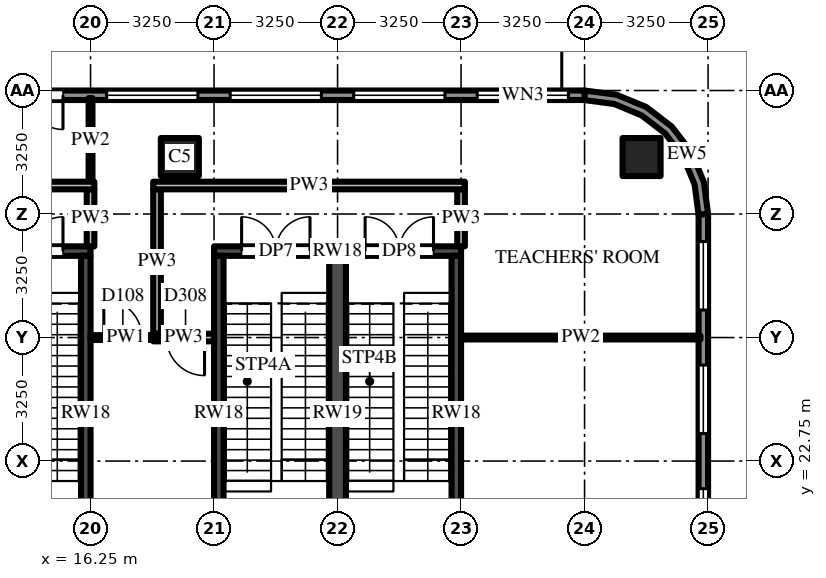
"""IFC4 building model, lengths in metres.
Left out: names, types, materials, properties, quantities, classifications, styles, units other than length and angle.
Written with IfcOpenShell. Run it as: python <this file> out.ifc"""

import sys

from ifc_helpers import new_model, si_unit, direction, frame, frame_2d, origin, origin_2d, place, context, subcontext, project, spatial, polyline, rectangle, outline, extrude, source, transform, mapped, element, fill, save


model = new_model("IFC4")
c1 = context("Model", 3, precision=1e-05, world=origin(), true_north=direction((0.0, 1.0)))
c2 = subcontext(c1, "Body", "Model", "MODEL_VIEW")
j1 = project(units=[si_unit("LENGTHUNIT", "METRE"), si_unit("PLANEANGLEUNIT", "RADIAN")], contexts=[c1])
p1 = place(None, origin())
s1 = spatial("IfcSite", under=j1, at=p1, CompositionType="ELEMENT")
p2 = place(p1, origin())
s2 = spatial("IfcBuilding", under=s1, at=p2, CompositionType="ELEMENT")
p3 = place(p2, frame((0.0, 0.0, 24.0)))
s3 = spatial("IfcBuildingStorey", under=s2, at=p3, CompositionType="ELEMENT", Elevation=24.0)
m1 = source(origin(), c2, "Body", "SweptSolid", [
    extrude(rectangle(XDim=1.0, YDim=1.0, at=origin_2d()), origin(), (0.0, 0.0, 1.0), 5.0),
])
for number, where, z_axis, x_axis in (
    (1, (18.6, 30.75, 0.0), (0.0, 0.0, 1.0), (1.0, 0.0, 0.0)),
    (2, (30.75, 30.75, 0.0), (0.0, 0.0, 1.0), (1.0, 0.0, 0.0)),
):
    element("IfcColumn", number, at=place(p3, frame(where, z_axis=z_axis, x_axis=x_axis)), inside=s3, PredefinedType="COLUMN", context=c2, shape_type="MappedRepresentation", body=[
        mapped(m1, transform((0.0, 0.0, 0.0))),
    ])
m2 = source(origin(), c2, "Body", "SweptSolid", [
    extrude(rectangle(XDim=6.5, YDim=0.25, at=frame_2d((3.25, 0.0))), origin(), (0.0, 0.0, 1.0), 4.7),
])
p4 = place(p3, frame((9.75, 28.275, 0.0), z_axis=(0.0, 0.0, 1.0), x_axis=(1.0, 0.0, 0.0)))
e3 = element("IfcWall", 3, at=p4, inside=s3, PredefinedType="SHEAR", context=c2, shape_type="MappedRepresentation", body=[
    mapped(m2, transform((0.0, 0.0, 0.0))),
])
m3 = source(origin(), c2, "Body", "SweptSolid", [
    extrude(rectangle(XDim=1.8, YDim=2.1, at=frame_2d((0.9, 1.05))), frame((0.0, 0.135, 0.0), z_axis=(0.0, -1.0, 0.0), x_axis=(1.0, 0.0, 0.0)), (0.0, 0.0, 1.0), 0.27),
])
p5 = place(p4, frame((0.725, 0.0, 0.0)))
e4 = element("IfcOpeningElement", 4, at=p5, cuts=e3, PredefinedType="OPENING", context=c2, shape_type="MappedRepresentation", body=[
    mapped(m3, transform((0.0, 0.0, 0.0))),
])
p6 = place(p4, frame((3.975, 0.0, 0.0)))
e5 = element("IfcOpeningElement", 5, at=p6, cuts=e3, PredefinedType="OPENING", context=c2, shape_type="MappedRepresentation", body=[
    mapped(m3, transform((0.0, 0.0, 0.0))),
])
m4 = source(origin(), c2, "Body", "SweptSolid", [
    extrude(rectangle(XDim=8.3, YDim=0.25, at=frame_2d((4.15, 0.0))), origin(), (0.0, 0.0, 1.0), 4.7),
])
p7 = place(p3, frame((16.125, 19.85, 0.0), z_axis=(0.0, 0.0, 1.0), x_axis=(0.0, 1.0, 0.0)))
e6 = element("IfcWall", 6, at=p7, inside=s3, PredefinedType="SHEAR", context=c2, shape_type="MappedRepresentation", body=[
    mapped(m4, transform((0.0, 0.0, 0.0))),
])
p8 = place(p3, frame((19.5, 28.275, 0.0), z_axis=(0.0, 0.0, 1.0), x_axis=(1.0, 0.0, 0.0)))
e7 = element("IfcWall", 7, at=p8, inside=s3, PredefinedType="SHEAR", context=c2, shape_type="MappedRepresentation", body=[
    mapped(m2, transform((0.0, 0.0, 0.0))),
])
p9 = place(p8, frame((0.725, 0.0, 0.0)))
e8 = element("IfcOpeningElement", 8, at=p9, cuts=e7, PredefinedType="OPENING", context=c2, shape_type="MappedRepresentation", body=[
    mapped(m3, transform((0.0, 0.0, 0.0))),
])
p10 = place(p8, frame((3.975, 0.0, 0.0)))
e9 = element("IfcOpeningElement", 9, at=p10, cuts=e7, PredefinedType="OPENING", context=c2, shape_type="MappedRepresentation", body=[
    mapped(m3, transform((0.0, 0.0, 0.0))),
])
for number, where, z_axis, x_axis in (
    (10, (19.625, 19.85, 0.0), (0.0, 0.0, 1.0), (0.0, 1.0, 0.0)),
    (11, (25.875, 19.85, 0.0), (0.0, 0.0, 1.0), (0.0, 1.0, 0.0)),
):
    element("IfcWall", number, at=place(p3, frame(where, z_axis=z_axis, x_axis=x_axis)), inside=s3, PredefinedType="SHEAR", context=c2, shape_type="MappedRepresentation", body=[
        mapped(m4, transform((0.0, 0.0, 0.0))),
    ])
m5 = source(origin(), c2, "Body", "SweptSolid", [
    extrude(rectangle(XDim=8.3, YDim=0.44, at=frame_2d((4.15, 0.0))), origin(), (0.0, 0.0, 1.0), 4.7),
])
p11 = place(p3, frame((22.75, 19.85, 0.0), z_axis=(0.0, 0.0, 1.0), x_axis=(0.0, 1.0, 0.0)))
e12 = element("IfcWall", 12, at=p11, inside=s3, PredefinedType="SHEAR", context=c2, shape_type="MappedRepresentation", body=[
    mapped(m5, transform((0.0, 0.0, 0.0))),
])
m6 = source(origin(), c2, "Body", "SweptSolid", [
    extrude(rectangle(XDim=58.5, YDim=0.25, at=frame_2d((29.25, 0.0))), origin(), (0.0, 0.0, 1.0), 4.7),
])
p12 = place(p3, frame((32.375, -29.25, 0.0), z_axis=(0.0, 0.0, 1.0), x_axis=(0.0, 1.0, 0.0)))
e13 = element("IfcWall", 13, at=p12, inside=s3, PredefinedType="SOLIDWALL", context=c2, shape_type="MappedRepresentation", body=[
    mapped(m6, transform((0.0, 0.0, 0.0))),
])
m7 = source(origin(), c2, "Body", "SweptSolid", [
    extrude(rectangle(XDim=1.8, YDim=3.3, at=frame_2d((0.9, 1.65))), frame((0.0, 0.135, 0.0), z_axis=(0.0, -1.0, 0.0), x_axis=(1.0, 0.0, 0.0)), (0.0, 0.0, 1.0), 0.27),
])
p13 = place(p12, frame((0.725, 0.0, 0.6)))
e14 = element("IfcOpeningElement", 14, at=p13, cuts=e13, PredefinedType="OPENING", context=c2, shape_type="MappedRepresentation", body=[
    mapped(m7, transform((0.0, 0.0, 0.0))),
])
p14 = place(p12, frame((3.975, 0.0, 0.6)))
e15 = element("IfcOpeningElement", 15, at=p14, cuts=e13, PredefinedType="OPENING", context=c2, shape_type="MappedRepresentation", body=[
    mapped(m7, transform((0.0, 0.0, 0.0))),
])
p15 = place(p12, frame((7.225, 0.0, 0.6)))
e16 = element("IfcOpeningElement", 16, at=p15, cuts=e13, PredefinedType="OPENING", context=c2, shape_type="MappedRepresentation", body=[
    mapped(m7, transform((0.0, 0.0, 0.0))),
])
p16 = place(p12, frame((10.475, 0.0, 0.6)))
e17 = element("IfcOpeningElement", 17, at=p16, cuts=e13, PredefinedType="OPENING", context=c2, shape_type="MappedRepresentation", body=[
    mapped(m7, transform((0.0, 0.0, 0.0))),
])
p17 = place(p12, frame((13.725, 0.0, 0.6)))
e18 = element("IfcOpeningElement", 18, at=p17, cuts=e13, PredefinedType="OPENING", context=c2, shape_type="MappedRepresentation", body=[
    mapped(m7, transform((0.0, 0.0, 0.0))),
])
p18 = place(p12, frame((16.975, 0.0, 0.6)))
e19 = element("IfcOpeningElement", 19, at=p18, cuts=e13, PredefinedType="OPENING", context=c2, shape_type="MappedRepresentation", body=[
    mapped(m7, transform((0.0, 0.0, 0.0))),
])
p19 = place(p12, frame((20.225, 0.0, 0.6)))
e20 = element("IfcOpeningElement", 20, at=p19, cuts=e13, PredefinedType="OPENING", context=c2, shape_type="MappedRepresentation", body=[
    mapped(m7, transform((0.0, 0.0, 0.0))),
])
p20 = place(p12, frame((23.475, 0.0, 0.6)))
e21 = element("IfcOpeningElement", 21, at=p20, cuts=e13, PredefinedType="OPENING", context=c2, shape_type="MappedRepresentation", body=[
    mapped(m7, transform((0.0, 0.0, 0.0))),
])
p21 = place(p12, frame((26.725, 0.0, 0.6)))
e22 = element("IfcOpeningElement", 22, at=p21, cuts=e13, PredefinedType="OPENING", context=c2, shape_type="MappedRepresentation", body=[
    mapped(m7, transform((0.0, 0.0, 0.0))),
])
p22 = place(p12, frame((29.975, 0.0, 0.6)))
e23 = element("IfcOpeningElement", 23, at=p22, cuts=e13, PredefinedType="OPENING", context=c2, shape_type="MappedRepresentation", body=[
    mapped(m7, transform((0.0, 0.0, 0.0))),
])
p23 = place(p12, frame((33.225, 0.0, 0.6)))
e24 = element("IfcOpeningElement", 24, at=p23, cuts=e13, PredefinedType="OPENING", context=c2, shape_type="MappedRepresentation", body=[
    mapped(m7, transform((0.0, 0.0, 0.0))),
])
p24 = place(p12, frame((36.475, 0.0, 0.6)))
e25 = element("IfcOpeningElement", 25, at=p24, cuts=e13, PredefinedType="OPENING", context=c2, shape_type="MappedRepresentation", body=[
    mapped(m7, transform((0.0, 0.0, 0.0))),
])
p25 = place(p12, frame((39.725, 0.0, 0.6)))
e26 = element("IfcOpeningElement", 26, at=p25, cuts=e13, PredefinedType="OPENING", context=c2, shape_type="MappedRepresentation", body=[
    mapped(m7, transform((0.0, 0.0, 0.0))),
])
p26 = place(p12, frame((42.975, 0.0, 0.6)))
e27 = element("IfcOpeningElement", 27, at=p26, cuts=e13, PredefinedType="OPENING", context=c2, shape_type="MappedRepresentation", body=[
    mapped(m7, transform((0.0, 0.0, 0.0))),
])
p27 = place(p12, frame((46.225, 0.0, 0.6)))
e28 = element("IfcOpeningElement", 28, at=p27, cuts=e13, PredefinedType="OPENING", context=c2, shape_type="MappedRepresentation", body=[
    mapped(m7, transform((0.0, 0.0, 0.0))),
])
p28 = place(p12, frame((49.475, 0.0, 0.6)))
e29 = element("IfcOpeningElement", 29, at=p28, cuts=e13, PredefinedType="OPENING", context=c2, shape_type="MappedRepresentation", body=[
    mapped(m7, transform((0.0, 0.0, 0.0))),
])
p29 = place(p12, frame((52.725, 0.0, 0.6)))
e30 = element("IfcOpeningElement", 30, at=p29, cuts=e13, PredefinedType="OPENING", context=c2, shape_type="MappedRepresentation", body=[
    mapped(m7, transform((0.0, 0.0, 0.0))),
])
p30 = place(p12, frame((55.975, 0.0, 0.6)))
e31 = element("IfcOpeningElement", 31, at=p30, cuts=e13, PredefinedType="OPENING", context=c2, shape_type="MappedRepresentation", body=[
    mapped(m7, transform((0.0, 0.0, 0.0))),
])
p31 = place(p3, origin())
e32 = element("IfcWall", 32, at=p31, inside=s3, PredefinedType="SOLIDWALL", context=c2, shape_type="SweptSolid", body=[
    extrude(outline(polyline([(32.5, 29.25), (32.389, 30.091), (32.065, 30.875), (31.548, 31.548), (30.875, 32.065), (30.091, 32.389), (29.25, 32.5), (29.234, 32.25), (30.026, 32.146), (30.749, 31.846), (31.37, 31.37), (31.846, 30.749), (32.146, 30.026), (32.25, 29.234), (32.5, 29.25)])), origin(), (0.0, 0.0, 1.0), 4.7),
])
p32 = place(p3, frame((29.25, 32.375, 0.0), z_axis=(0.0, 0.0, 1.0), x_axis=(-1.0, 0.0, 0.0)))
e33 = element("IfcWall", 33, at=p32, inside=s3, PredefinedType="SOLIDWALL", context=c2, shape_type="MappedRepresentation", body=[
    mapped(m6, transform((0.0, 0.0, 0.0))),
])
m8 = source(origin(), c2, "Body", "SweptSolid", [
    extrude(rectangle(XDim=2.4, YDim=3.3, at=frame_2d((1.2, 1.65))), frame((0.0, 0.135, 0.0), z_axis=(0.0, -1.0, 0.0), x_axis=(1.0, 0.0, 0.0)), (0.0, 0.0, 1.0), 0.27),
])
p33 = place(p32, frame((0.425, 0.0, 0.6)))
e34 = element("IfcOpeningElement", 34, at=p33, cuts=e33, PredefinedType="OPENING", context=c2, shape_type="MappedRepresentation", body=[
    mapped(m8, transform((0.0, 0.0, 0.0))),
])
p34 = place(p32, frame((3.675, 0.0, 0.6)))
e35 = element("IfcOpeningElement", 35, at=p34, cuts=e33, PredefinedType="OPENING", context=c2, shape_type="MappedRepresentation", body=[
    mapped(m8, transform((0.0, 0.0, 0.0))),
])
p35 = place(p32, frame((6.925, 0.0, 0.6)))
e36 = element("IfcOpeningElement", 36, at=p35, cuts=e33, PredefinedType="OPENING", context=c2, shape_type="MappedRepresentation", body=[
    mapped(m8, transform((0.0, 0.0, 0.0))),
])
p36 = place(p32, frame((10.175, 0.0, 0.6)))
e37 = element("IfcOpeningElement", 37, at=p36, cuts=e33, PredefinedType="OPENING", context=c2, shape_type="MappedRepresentation", body=[
    mapped(m8, transform((0.0, 0.0, 0.0))),
])
m9 = source(origin(), c2, "Body", "SweptSolid", [
    extrude(rectangle(XDim=1.8, YDim=2.4, at=frame_2d((0.9, 1.2))), frame((0.0, 0.135, 0.0), z_axis=(0.0, -1.0, 0.0), x_axis=(1.0, 0.0, 0.0)), (0.0, 0.0, 1.0), 0.27),
])
p37 = place(p32, frame((13.725, 0.0, 0.0)))
e38 = element("IfcOpeningElement", 38, at=p37, cuts=e33, PredefinedType="OPENING", context=c2, shape_type="MappedRepresentation", body=[
    mapped(m9, transform((0.0, 0.0, 0.0))),
])
p38 = place(p32, frame((16.675, 0.0, 0.6)))
e39 = element("IfcOpeningElement", 39, at=p38, cuts=e33, PredefinedType="OPENING", context=c2, shape_type="MappedRepresentation", body=[
    mapped(m8, transform((0.0, 0.0, 0.0))),
])
p39 = place(p32, frame((19.925, 0.0, 0.6)))
e40 = element("IfcOpeningElement", 40, at=p39, cuts=e33, PredefinedType="OPENING", context=c2, shape_type="MappedRepresentation", body=[
    mapped(m8, transform((0.0, 0.0, 0.0))),
])
p40 = place(p32, frame((23.175, 0.0, 0.6)))
e41 = element("IfcOpeningElement", 41, at=p40, cuts=e33, PredefinedType="OPENING", context=c2, shape_type="MappedRepresentation", body=[
    mapped(m8, transform((0.0, 0.0, 0.0))),
])
p41 = place(p32, frame((26.425, 0.0, 0.6)))
e42 = element("IfcOpeningElement", 42, at=p41, cuts=e33, PredefinedType="OPENING", context=c2, shape_type="MappedRepresentation", body=[
    mapped(m8, transform((0.0, 0.0, 0.0))),
])
p42 = place(p32, frame((29.675, 0.0, 0.6)))
e43 = element("IfcOpeningElement", 43, at=p42, cuts=e33, PredefinedType="OPENING", context=c2, shape_type="MappedRepresentation", body=[
    mapped(m8, transform((0.0, 0.0, 0.0))),
])
p43 = place(p32, frame((32.925, 0.0, 0.6)))
e44 = element("IfcOpeningElement", 44, at=p43, cuts=e33, PredefinedType="OPENING", context=c2, shape_type="MappedRepresentation", body=[
    mapped(m8, transform((0.0, 0.0, 0.0))),
])
p44 = place(p32, frame((36.175, 0.0, 0.6)))
e45 = element("IfcOpeningElement", 45, at=p44, cuts=e33, PredefinedType="OPENING", context=c2, shape_type="MappedRepresentation", body=[
    mapped(m8, transform((0.0, 0.0, 0.0))),
])
p45 = place(p32, frame((39.425, 0.0, 0.6)))
e46 = element("IfcOpeningElement", 46, at=p45, cuts=e33, PredefinedType="OPENING", context=c2, shape_type="MappedRepresentation", body=[
    mapped(m8, transform((0.0, 0.0, 0.0))),
])
p46 = place(p32, frame((42.675, 0.0, 0.6)))
e47 = element("IfcOpeningElement", 47, at=p46, cuts=e33, PredefinedType="OPENING", context=c2, shape_type="MappedRepresentation", body=[
    mapped(m8, transform((0.0, 0.0, 0.0))),
])
p47 = place(p32, frame((45.925, 0.0, 0.6)))
e48 = element("IfcOpeningElement", 48, at=p47, cuts=e33, PredefinedType="OPENING", context=c2, shape_type="MappedRepresentation", body=[
    mapped(m8, transform((0.0, 0.0, 0.0))),
])
p48 = place(p32, frame((49.175, 0.0, 0.6)))
e49 = element("IfcOpeningElement", 49, at=p48, cuts=e33, PredefinedType="OPENING", context=c2, shape_type="MappedRepresentation", body=[
    mapped(m8, transform((0.0, 0.0, 0.0))),
])
p49 = place(p32, frame((52.425, 0.0, 0.6)))
e50 = element("IfcOpeningElement", 50, at=p49, cuts=e33, PredefinedType="OPENING", context=c2, shape_type="MappedRepresentation", body=[
    mapped(m8, transform((0.0, 0.0, 0.0))),
])
p50 = place(p32, frame((55.675, 0.0, 0.6)))
e51 = element("IfcOpeningElement", 51, at=p50, cuts=e33, PredefinedType="OPENING", context=c2, shape_type="MappedRepresentation", body=[
    mapped(m8, transform((0.0, 0.0, 0.0))),
])
m10 = source(origin(), c2, "Body", "SweptSolid", [
    extrude(rectangle(XDim=1.5, YDim=0.2, at=frame_2d((0.75, 0.0))), origin(), (0.0, 0.0, 1.0), 4.7),
])
p51 = place(p3, frame((16.25, 29.9, 0.0), z_axis=(0.0, 0.0, 1.0), x_axis=(0.0, -1.0, 0.0)))
e52 = element("IfcWall", 52, at=p51, inside=s3, PredefinedType="PARTITIONING", context=c2, shape_type="MappedRepresentation", body=[
    mapped(m10, transform((0.0, 0.0, 0.0))),
])
m11 = source(origin(), c2, "Body", "SweptSolid", [
    extrude(rectangle(XDim=2.2, YDim=0.1, at=frame_2d((1.1, 0.0))), origin(), (0.0, 0.0, 1.0), 3.762),
])
p52 = place(p3, frame((16.25, 30.1, 0.0), z_axis=(0.0, 0.0, 1.0), x_axis=(0.0, 1.0, 0.0)))
e53 = element("IfcWall", 53, at=p52, inside=s3, PredefinedType="PARTITIONING", context=c2, shape_type="MappedRepresentation", body=[
    mapped(m11, transform((0.0, 0.0, 0.0))),
])
m12 = source(origin(), c2, "Body", "SweptSolid", [
    extrude(rectangle(XDim=3.8, YDim=0.2, at=frame_2d((1.9, 0.0))), origin(), (0.0, 0.0, 1.0), 4.274),
])
p53 = place(p3, frame((18.0, 29.9, 0.0), z_axis=(0.0, 0.0, 1.0), x_axis=(0.0, -1.0, 0.0)))
e54 = element("IfcWall", 54, at=p53, inside=s3, PredefinedType="PARTITIONING", context=c2, shape_type="MappedRepresentation", body=[
    mapped(m12, transform((0.0, 0.0, 0.0))),
])
p54 = place(p3, frame((26.0, 29.9, 0.0), z_axis=(0.0, 0.0, 1.0), x_axis=(0.0, -1.0, 0.0)))
e55 = element("IfcWall", 55, at=p54, inside=s3, PredefinedType="PARTITIONING", context=c2, shape_type="MappedRepresentation", body=[
    mapped(m10, transform((0.0, 0.0, 0.0))),
])
m13 = source(origin(), c2, "Body", "SweptSolid", [
    extrude(rectangle(XDim=1.6, YDim=0.2, at=frame_2d((0.8, 0.0))), origin(), (0.0, 0.0, 1.0), 3.762),
])
p55 = place(p3, frame((19.5, 26.0, 0.0), z_axis=(0.0, 0.0, 1.0), x_axis=(-1.0, 0.0, 0.0)))
e56 = element("IfcWall", 56, at=p55, inside=s3, PredefinedType="PARTITIONING", context=c2, shape_type="MappedRepresentation", body=[
    mapped(m13, transform((0.0, 0.0, 0.0))),
])
m14 = source(origin(), c2, "Body", "SweptSolid", [
    extrude(rectangle(XDim=1.0, YDim=2.1, at=frame_2d((0.5, 1.05))), frame((0.0, 0.11, 0.0), z_axis=(0.0, -1.0, 0.0), x_axis=(1.0, 0.0, 0.0)), (0.0, 0.0, 1.0), 0.22),
])
p56 = place(p55, frame((0.25, 0.0, 0.0)))
e57 = element("IfcOpeningElement", 57, at=p56, cuts=e56, PredefinedType="OPENING", context=c2, shape_type="MappedRepresentation", body=[
    mapped(m14, transform((0.0, 0.0, 0.0))),
])
m15 = source(origin(), c2, "Body", "SweptSolid", [
    extrude(rectangle(XDim=6.3, YDim=0.1, at=frame_2d((3.15, 0.0))), origin(), (0.0, 0.0, 1.0), 3.762),
])
p57 = place(p3, frame((26.0, 26.0, 0.0), z_axis=(0.0, 0.0, 1.0), x_axis=(1.0, 0.0, 0.0)))
e58 = element("IfcWall", 58, at=p57, inside=s3, PredefinedType="PARTITIONING", context=c2, shape_type="MappedRepresentation", body=[
    mapped(m15, transform((0.0, 0.0, 0.0))),
])
m16 = source(origin(), c2, "Body", "SweptSolid", [
    extrude(rectangle(XDim=1.85, YDim=0.125, at=frame_2d((0.925, 0.0))), origin(), (0.0, 0.0, 1.0), 4.7),
])
p58 = place(p3, frame((16.25, 26.0, 0.0), z_axis=(0.0, 0.0, 1.0), x_axis=(1.0, 0.0, 0.0)))
e59 = element("IfcWall", 59, at=p58, inside=s3, PredefinedType="PARTITIONING", context=c2, shape_type="MappedRepresentation", body=[
    mapped(m16, transform((0.0, 0.0, 0.0))),
])
m17 = source(origin(), c2, "Body", "SweptSolid", [
    extrude(rectangle(XDim=1.0, YDim=2.1, at=frame_2d((0.5, 1.05))), frame((0.0, 0.073, 0.0), z_axis=(0.0, -1.0, 0.0), x_axis=(1.0, 0.0, 0.0)), (0.0, 0.0, 1.0), 0.145),
])
p59 = place(p58, frame((0.35, 0.0, 0.0)))
e60 = element("IfcOpeningElement", 60, at=p59, cuts=e59, PredefinedType="OPENING", context=c2, shape_type="MappedRepresentation", body=[
    mapped(m17, transform((0.0, 0.0, 0.0))),
])
m18 = source(origin(), c2, "Body", "SweptSolid", [
    extrude(rectangle(XDim=8.2, YDim=0.2, at=frame_2d((4.1, 0.0))), origin(), (0.0, 0.0, 1.0), 4.7),
])
p60 = place(p3, frame((16.35, 30.0, 0.0), z_axis=(0.0, 0.0, 1.0), x_axis=(-1.0, 0.0, 0.0)))
e61 = element("IfcWall", 61, at=p60, inside=s3, PredefinedType="PARTITIONING", context=c2, shape_type="MappedRepresentation", body=[
    mapped(m18, transform((0.0, 0.0, 0.0))),
])
m19 = source(origin(), c2, "Body", "SweptSolid", [
    extrude(rectangle(XDim=8.2, YDim=0.2, at=frame_2d((4.1, 0.0))), origin(), (0.0, 0.0, 1.0), 3.762),
])
p61 = place(p3, frame((26.1, 30.0, 0.0), z_axis=(0.0, 0.0, 1.0), x_axis=(-1.0, 0.0, 0.0)))
e62 = element("IfcWall", 62, at=p61, inside=s3, PredefinedType="PARTITIONING", context=c2, shape_type="MappedRepresentation", body=[
    mapped(m19, transform((0.0, 0.0, 0.0))),
])
m20 = source(origin(), c2, "Body", "SweptSolid", [
    extrude(rectangle(XDim=1.8, YDim=2.1, at=frame_2d((0.9, 1.05))), frame((0.0, 0.025, 0.0), z_axis=(0.0, -1.0, 0.0), x_axis=(1.0, 0.0, 0.0)), (0.0, 0.0, 1.0), 0.05),
])
p62 = place(p6, origin())
e63 = element("IfcDoor", 63, at=p62, inside=s3, OperationType="DOUBLE_DOOR_SINGLE_SWING", PredefinedType="DOOR", context=c2, shape_type="MappedRepresentation", body=[
    mapped(m20, transform((0.0, 0.0, 0.0))),
])
fill(e5, e63)
p63 = place(p9, origin())
e64 = element("IfcDoor", 64, at=p63, inside=s3, OperationType="DOUBLE_DOOR_SINGLE_SWING", PredefinedType="DOOR", context=c2, shape_type="MappedRepresentation", body=[
    mapped(m20, transform((0.0, 0.0, 0.0))),
])
fill(e8, e64)
p64 = place(p10, origin())
e65 = element("IfcDoor", 65, at=p64, inside=s3, OperationType="DOUBLE_DOOR_SINGLE_SWING", PredefinedType="DOOR", context=c2, shape_type="MappedRepresentation", body=[
    mapped(m20, transform((0.0, 0.0, 0.0))),
])
fill(e9, e65)
m21 = source(origin(), c2, "Body", "SweptSolid", [
    extrude(rectangle(XDim=1.8, YDim=3.3, at=frame_2d((0.9, 1.65))), frame((0.0, 0.03, 0.0), z_axis=(0.0, -1.0, 0.0), x_axis=(1.0, 0.0, 0.0)), (0.0, 0.0, 1.0), 0.06),
])
p65 = place(p28, origin())
e66 = element("IfcWindow", 66, at=p65, inside=s3, PartitioningType="SINGLE_PANEL", PredefinedType="WINDOW", context=c2, shape_type="MappedRepresentation", body=[
    mapped(m21, transform((0.0, 0.0, 0.0))),
])
fill(e29, e66)
p66 = place(p29, origin())
e67 = element("IfcWindow", 67, at=p66, inside=s3, PartitioningType="SINGLE_PANEL", PredefinedType="WINDOW", context=c2, shape_type="MappedRepresentation", body=[
    mapped(m21, transform((0.0, 0.0, 0.0))),
])
fill(e30, e67)
p67 = place(p30, origin())
e68 = element("IfcWindow", 68, at=p67, inside=s3, PartitioningType="SINGLE_PANEL", PredefinedType="WINDOW", context=c2, shape_type="MappedRepresentation", body=[
    mapped(m21, transform((0.0, 0.0, 0.0))),
])
fill(e31, e68)
m22 = source(origin(), c2, "Body", "SweptSolid", [
    extrude(rectangle(XDim=2.4, YDim=3.3, at=frame_2d((1.2, 1.65))), frame((0.0, 0.03, 0.0), z_axis=(0.0, -1.0, 0.0), x_axis=(1.0, 0.0, 0.0)), (0.0, 0.0, 1.0), 0.06),
])
p68 = place(p33, origin())
e69 = element("IfcWindow", 69, at=p68, inside=s3, PartitioningType="SINGLE_PANEL", PredefinedType="WINDOW", context=c2, shape_type="MappedRepresentation", body=[
    mapped(m22, transform((0.0, 0.0, 0.0))),
])
fill(e34, e69)
p69 = place(p34, origin())
e70 = element("IfcWindow", 70, at=p69, inside=s3, PartitioningType="SINGLE_PANEL", PredefinedType="WINDOW", context=c2, shape_type="MappedRepresentation", body=[
    mapped(m22, transform((0.0, 0.0, 0.0))),
])
fill(e35, e70)
p70 = place(p35, origin())
e71 = element("IfcWindow", 71, at=p70, inside=s3, PartitioningType="SINGLE_PANEL", PredefinedType="WINDOW", context=c2, shape_type="MappedRepresentation", body=[
    mapped(m22, transform((0.0, 0.0, 0.0))),
])
fill(e36, e71)
p71 = place(p36, origin())
e72 = element("IfcWindow", 72, at=p71, inside=s3, PartitioningType="SINGLE_PANEL", PredefinedType="WINDOW", context=c2, shape_type="MappedRepresentation", body=[
    mapped(m22, transform((0.0, 0.0, 0.0))),
])
fill(e37, e72)
m23 = source(origin(), c2, "Body", "SweptSolid", [
    extrude(rectangle(XDim=1.8, YDim=2.4, at=frame_2d((0.9, 1.2))), frame((0.0, 0.025, 0.0), z_axis=(0.0, -1.0, 0.0), x_axis=(1.0, 0.0, 0.0)), (0.0, 0.0, 1.0), 0.05),
])
p72 = place(p37, origin())
e73 = element("IfcDoor", 73, at=p72, inside=s3, OperationType="DOUBLE_DOOR_SINGLE_SWING", PredefinedType="DOOR", context=c2, shape_type="MappedRepresentation", body=[
    mapped(m23, transform((0.0, 0.0, 0.0))),
])
fill(e38, e73)
m24 = source(origin(), c2, "Body", "SweptSolid", [
    extrude(rectangle(XDim=1.0, YDim=2.1, at=frame_2d((0.5, 1.05))), frame((0.0, 0.025, 0.0), z_axis=(0.0, -1.0, 0.0), x_axis=(1.0, 0.0, 0.0)), (0.0, 0.0, 1.0), 0.05),
])
p73 = place(p59, origin())
e74 = element("IfcDoor", 74, at=p73, inside=s3, OperationType="SINGLE_SWING_LEFT", PredefinedType="DOOR", context=c2, shape_type="MappedRepresentation", body=[
    mapped(m24, transform((0.0, 0.0, 0.0))),
])
fill(e60, e74)
p74 = place(p56, origin())
e75 = element("IfcDoor", 75, at=p74, inside=s3, OperationType="SINGLE_SWING_LEFT", PredefinedType="DOOR", context=c2, shape_type="MappedRepresentation", body=[
    mapped(m24, transform((0.0, 0.0, 0.0))),
])
fill(e57, e75)
save(model, sys.argv[1])
